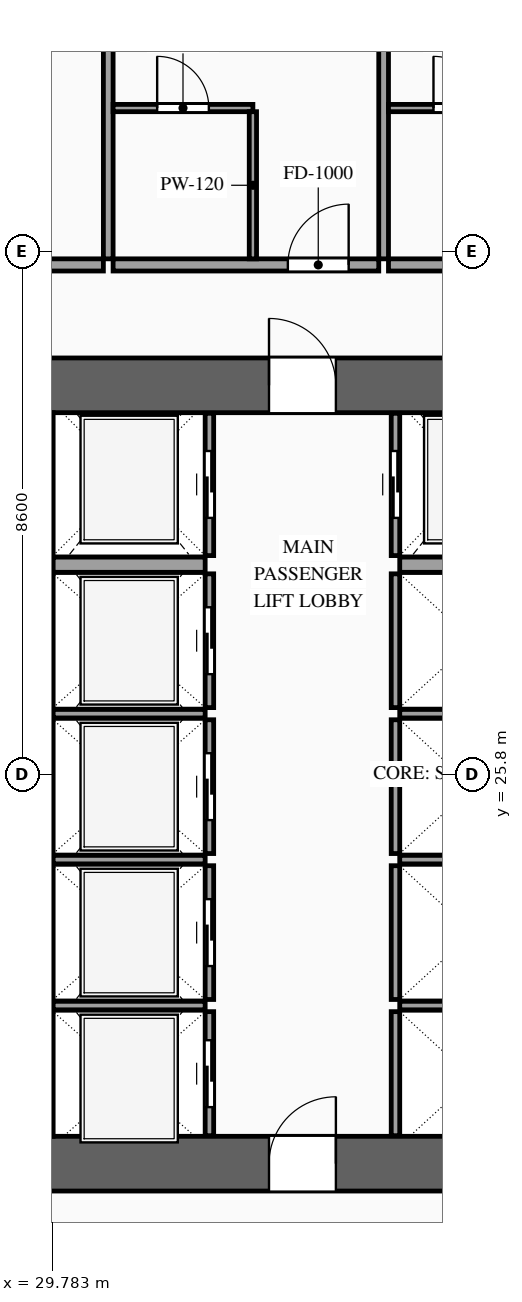
"""IFC4 building model, lengths in metres.
Left out: names, types, materials, properties, quantities, classifications, styles, units other than length and angle.
Written with IfcOpenShell. Run it as: python <this file> out.ifc"""

import sys

from ifc_helpers import new_model, si_unit, direction, frame, frame_2d, origin, place, context, subcontext, project, spatial, rectangle, extrude, source, transform, mapped, element, fill, save


model = new_model("IFC4")
c1 = context("Model", 3, precision=1e-05, world=origin(), true_north=direction((0.0, 1.0)))
c2 = subcontext(c1, "Body", "Model", "MODEL_VIEW")
j1 = project(units=[si_unit("LENGTHUNIT", "METRE"), si_unit("PLANEANGLEUNIT", "RADIAN")], contexts=[c1])
p1 = place(None, origin())
s1 = spatial("IfcSite", under=j1, at=p1, CompositionType="ELEMENT")
p2 = place(p1, origin())
s2 = spatial("IfcBuilding", under=s1, at=p2, CompositionType="ELEMENT")
p3 = place(p2, frame((0.0, 0.0, 67.6)))
s3 = spatial("IfcBuildingStorey", under=s2, at=p3, CompositionType="ELEMENT", Elevation=67.6)
p4 = place(p3, frame((23.35, 19.4, 0.0), z_axis=(0.0, 0.0, 1.0), x_axis=(1.0, 0.0, 0.0)))
e1 = element("IfcWall", 1, at=p4, inside=s3, PredefinedType="SHEAR", context=c2, shape_type="SweptSolid", body=[
    extrude(rectangle(XDim=27.3, YDim=0.9, at=frame_2d((13.65, 0.0))), origin(), (0.0, 0.0, 1.0), 3.6),
])
p5 = place(p4, frame((2.1, 0.0, 0.0)))
e2 = element("IfcOpeningElement", 2, at=p5, cuts=e1, PredefinedType="OPENING", context=c2, shape_type="SweptSolid", body=[
    extrude(rectangle(XDim=1.1, YDim=2.2, at=frame_2d((0.55, 1.1))), frame((0.0, 0.465, 0.0), z_axis=(0.0, -1.0, 0.0), x_axis=(1.0, 0.0, 0.0)), (0.0, 0.0, 1.0), 0.93),
])
p6 = place(p4, frame((10.0, 0.0, 0.0)))
e3 = element("IfcOpeningElement", 3, at=p6, cuts=e1, PredefinedType="OPENING", context=c2, shape_type="SweptSolid", body=[
    extrude(rectangle(XDim=1.1, YDim=2.2, at=frame_2d((0.55, 1.1))), frame((0.0, 0.465, 0.0), z_axis=(0.0, -1.0, 0.0), x_axis=(1.0, 0.0, 0.0)), (0.0, 0.0, 1.0), 0.93),
])
p7 = place(p4, frame((23.2, 0.0, 0.0)))
e4 = element("IfcOpeningElement", 4, at=p7, cuts=e1, PredefinedType="OPENING", context=c2, shape_type="SweptSolid", body=[
    extrude(rectangle(XDim=1.1, YDim=2.2, at=frame_2d((0.55, 1.1))), frame((0.0, 0.465, 0.0), z_axis=(0.0, -1.0, 0.0), x_axis=(1.0, 0.0, 0.0)), (0.0, 0.0, 1.0), 0.93),
])
p8 = place(p4, frame((19.82, 0.0, 0.0)))
e5 = element("IfcOpeningElement", 5, at=p8, cuts=e1, PredefinedType="OPENING", context=c2, shape_type="SweptSolid", body=[
    extrude(rectangle(XDim=0.9, YDim=2.15, at=frame_2d((0.45, 1.075))), frame((0.0, 0.465, 0.0), z_axis=(0.0, -1.0, 0.0), x_axis=(1.0, 0.0, 0.0)), (0.0, 0.0, 1.0), 0.93),
])
p9 = place(p4, frame((18.38, 0.0, 0.0)))
e6 = element("IfcOpeningElement", 6, at=p9, cuts=e1, PredefinedType="OPENING", context=c2, shape_type="SweptSolid", body=[
    extrude(rectangle(XDim=0.9, YDim=2.15, at=frame_2d((0.45, 1.075))), frame((0.0, 0.465, 0.0), z_axis=(0.0, -1.0, 0.0), x_axis=(1.0, 0.0, 0.0)), (0.0, 0.0, 1.0), 0.93),
])
p10 = place(p3, frame((23.35, 32.2, 0.0), z_axis=(0.0, 0.0, 1.0), x_axis=(1.0, 0.0, 0.0)))
e7 = element("IfcWall", 7, at=p10, inside=s3, PredefinedType="SHEAR", context=c2, shape_type="SweptSolid", body=[
    extrude(rectangle(XDim=27.3, YDim=0.9, at=frame_2d((13.65, 0.0))), origin(), (0.0, 0.0, 1.0), 3.6),
])
p11 = place(p10, frame((4.72, 0.0, 0.0)))
e8 = element("IfcOpeningElement", 8, at=p11, cuts=e7, PredefinedType="OPENING", context=c2, shape_type="SweptSolid", body=[
    extrude(rectangle(XDim=0.9, YDim=2.15, at=frame_2d((0.45, 1.075))), frame((0.0, 0.465, 0.0), z_axis=(0.0, -1.0, 0.0), x_axis=(1.0, 0.0, 0.0)), (0.0, 0.0, 1.0), 0.93),
])
p12 = place(p10, frame((10.0, 0.0, 0.0)))
e9 = element("IfcOpeningElement", 9, at=p12, cuts=e7, PredefinedType="OPENING", context=c2, shape_type="SweptSolid", body=[
    extrude(rectangle(XDim=1.1, YDim=2.2, at=frame_2d((0.55, 1.1))), frame((0.0, 0.465, 0.0), z_axis=(0.0, -1.0, 0.0), x_axis=(1.0, 0.0, 0.0)), (0.0, 0.0, 1.0), 0.93),
])
p13 = place(p10, frame((15.85, 0.0, 0.0)))
e10 = element("IfcOpeningElement", 10, at=p13, cuts=e7, PredefinedType="OPENING", context=c2, shape_type="SweptSolid", body=[
    extrude(rectangle(XDim=1.1, YDim=2.2, at=frame_2d((0.55, 1.1))), frame((0.0, 0.465, 0.0), z_axis=(0.0, -1.0, 0.0), x_axis=(1.0, 0.0, 0.0)), (0.0, 0.0, 1.0), 0.93),
])
p14 = place(p10, frame((18.38, 0.0, 0.0)))
e11 = element("IfcOpeningElement", 11, at=p14, cuts=e7, PredefinedType="OPENING", context=c2, shape_type="SweptSolid", body=[
    extrude(rectangle(XDim=0.9, YDim=2.15, at=frame_2d((0.45, 1.075))), frame((0.0, 0.465, 0.0), z_axis=(0.0, -1.0, 0.0), x_axis=(1.0, 0.0, 0.0)), (0.0, 0.0, 1.0), 0.93),
])
p15 = place(p10, frame((19.82, 0.0, 0.0)))
e12 = element("IfcOpeningElement", 12, at=p15, cuts=e7, PredefinedType="OPENING", context=c2, shape_type="SweptSolid", body=[
    extrude(rectangle(XDim=0.9, YDim=2.15, at=frame_2d((0.45, 1.075))), frame((0.0, 0.465, 0.0), z_axis=(0.0, -1.0, 0.0), x_axis=(1.0, 0.0, 0.0)), (0.0, 0.0, 1.0), 0.93),
])
m1 = source(origin(), c2, "Body", "SweptSolid", [
    extrude(rectangle(XDim=11.9, YDim=0.3, at=frame_2d((5.95, 0.0))), origin(), (0.0, 0.0, 1.0), 3.6),
])
p16 = place(p3, frame((29.65, 19.85, 0.0), z_axis=(0.0, 0.0, 1.0), x_axis=(0.0, 1.0, 0.0)))
e13 = element("IfcWall", 13, at=p16, inside=s3, PredefinedType="SOLIDWALL", context=c2, shape_type="MappedRepresentation", body=[
    mapped(m1, transform((0.0, 0.0, 0.0), scale=1.0)),
])
p17 = place(p3, frame((32.37, 19.86, 0.0), z_axis=(0.0, 0.0, 1.0), x_axis=(0.0, 1.0, 0.0)))
e14 = element("IfcWall", 14, at=p17, inside=s3, PredefinedType="SOLIDWALL", context=c2, shape_type="SweptSolid", body=[
    extrude(rectangle(XDim=2.04, YDim=0.14, at=frame_2d((1.02, 0.0))), origin(), (0.0, 0.0, 1.0), 3.38),
])
p18 = place(p17, frame((0.47, 0.0, 0.0)))
e15 = element("IfcOpeningElement", 15, at=p18, cuts=e14, PredefinedType="OPENING", context=c2, shape_type="SweptSolid", body=[
    extrude(rectangle(XDim=1.1, YDim=2.2, at=frame_2d((0.55, 1.1))), frame((0.0, 0.085, 0.0), z_axis=(0.0, -1.0, 0.0), x_axis=(1.0, 0.0, 0.0)), (0.0, 0.0, 1.0), 0.17),
])
m2 = source(origin(), c2, "Body", "SweptSolid", [
    extrude(rectangle(XDim=2.5, YDim=0.14, at=frame_2d((1.25, 0.0))), origin(), (0.0, 0.0, 1.0), 3.38),
])
p19 = place(p3, frame((29.8, 22.0, 0.0), z_axis=(0.0, 0.0, 1.0), x_axis=(1.0, 0.0, 0.0)))
e16 = element("IfcWall", 16, at=p19, inside=s3, PredefinedType="SOLIDWALL", context=c2, shape_type="MappedRepresentation", body=[
    mapped(m2, transform((0.0, 0.0, 0.0), scale=1.0)),
])
p20 = place(p3, frame((32.37, 22.1, 0.0), z_axis=(0.0, 0.0, 1.0), x_axis=(0.0, 1.0, 0.0)))
e17 = element("IfcWall", 17, at=p20, inside=s3, PredefinedType="SOLIDWALL", context=c2, shape_type="SweptSolid", body=[
    extrude(rectangle(XDim=2.2, YDim=0.14, at=frame_2d((1.1, 0.0))), origin(), (0.0, 0.0, 1.0), 3.38),
])
p21 = place(p20, frame((0.55, 0.0, 0.0)))
e18 = element("IfcOpeningElement", 18, at=p21, cuts=e17, PredefinedType="OPENING", context=c2, shape_type="SweptSolid", body=[
    extrude(rectangle(XDim=1.1, YDim=2.2, at=frame_2d((0.55, 1.1))), frame((0.0, 0.085, 0.0), z_axis=(0.0, -1.0, 0.0), x_axis=(1.0, 0.0, 0.0)), (0.0, 0.0, 1.0), 0.17),
])
p22 = place(p3, frame((29.8, 24.4, 0.0), z_axis=(0.0, 0.0, 1.0), x_axis=(1.0, 0.0, 0.0)))
e19 = element("IfcWall", 19, at=p22, inside=s3, PredefinedType="SOLIDWALL", context=c2, shape_type="MappedRepresentation", body=[
    mapped(m2, transform((0.0, 0.0, 0.0), scale=1.0)),
])
p23 = place(p3, frame((32.37, 24.5, 0.0), z_axis=(0.0, 0.0, 1.0), x_axis=(0.0, 1.0, 0.0)))
e20 = element("IfcWall", 20, at=p23, inside=s3, PredefinedType="SOLIDWALL", context=c2, shape_type="SweptSolid", body=[
    extrude(rectangle(XDim=2.2, YDim=0.14, at=frame_2d((1.1, 0.0))), origin(), (0.0, 0.0, 1.0), 3.38),
])
p24 = place(p23, frame((0.55, 0.0, 0.0)))
e21 = element("IfcOpeningElement", 21, at=p24, cuts=e20, PredefinedType="OPENING", context=c2, shape_type="SweptSolid", body=[
    extrude(rectangle(XDim=1.1, YDim=2.2, at=frame_2d((0.55, 1.1))), frame((0.0, 0.085, 0.0), z_axis=(0.0, -1.0, 0.0), x_axis=(1.0, 0.0, 0.0)), (0.0, 0.0, 1.0), 0.17),
])
p25 = place(p3, frame((29.8, 26.8, 0.0), z_axis=(0.0, 0.0, 1.0), x_axis=(1.0, 0.0, 0.0)))
e22 = element("IfcWall", 22, at=p25, inside=s3, PredefinedType="SOLIDWALL", context=c2, shape_type="MappedRepresentation", body=[
    mapped(m2, transform((0.0, 0.0, 0.0), scale=1.0)),
])
p26 = place(p3, frame((32.37, 26.9, 0.0), z_axis=(0.0, 0.0, 1.0), x_axis=(0.0, 1.0, 0.0)))
e23 = element("IfcWall", 23, at=p26, inside=s3, PredefinedType="SOLIDWALL", context=c2, shape_type="SweptSolid", body=[
    extrude(rectangle(XDim=2.2, YDim=0.14, at=frame_2d((1.1, 0.0))), origin(), (0.0, 0.0, 1.0), 3.38),
])
p27 = place(p26, frame((0.55, 0.0, 0.0)))
e24 = element("IfcOpeningElement", 24, at=p27, cuts=e23, PredefinedType="OPENING", context=c2, shape_type="SweptSolid", body=[
    extrude(rectangle(XDim=1.1, YDim=2.2, at=frame_2d((0.55, 1.1))), frame((0.0, 0.085, 0.0), z_axis=(0.0, -1.0, 0.0), x_axis=(1.0, 0.0, 0.0)), (0.0, 0.0, 1.0), 0.17),
])
p28 = place(p3, frame((32.37, 29.4, 0.0), z_axis=(0.0, 0.0, 1.0), x_axis=(0.0, 1.0, 0.0)))
e25 = element("IfcWall", 25, at=p28, inside=s3, PredefinedType="SOLIDWALL", context=c2, shape_type="SweptSolid", body=[
    extrude(rectangle(XDim=2.34, YDim=0.14, at=frame_2d((1.17, 0.0))), origin(), (0.0, 0.0, 1.0), 3.38),
])
p29 = place(p28, frame((0.62, 0.0, 0.0)))
e26 = element("IfcOpeningElement", 26, at=p29, cuts=e25, PredefinedType="OPENING", context=c2, shape_type="SweptSolid", body=[
    extrude(rectangle(XDim=1.1, YDim=2.2, at=frame_2d((0.55, 1.1))), frame((0.0, 0.085, 0.0), z_axis=(0.0, -1.0, 0.0), x_axis=(1.0, 0.0, 0.0)), (0.0, 0.0, 1.0), 0.17),
])
m3 = source(origin(), c2, "Body", "SweptSolid", [
    extrude(rectangle(XDim=2.5, YDim=0.25, at=frame_2d((1.25, 0.0))), origin(), (0.0, 0.0, 1.0), 3.38),
])
p30 = place(p3, frame((29.8, 29.25, 0.0), z_axis=(0.0, 0.0, 1.0), x_axis=(1.0, 0.0, 0.0)))
e27 = element("IfcWall", 27, at=p30, inside=s3, PredefinedType="SOLIDWALL", context=c2, shape_type="MappedRepresentation", body=[
    mapped(m3, transform((0.0, 0.0, 0.0), scale=1.0)),
])
m4 = source(origin(), c2, "Body", "SweptSolid", [
    extrude(rectangle(XDim=2.04, YDim=0.14, at=frame_2d((1.02, 0.0))), origin(), (0.0, 0.0, 1.0), 3.38),
])
p31 = place(p3, frame((35.43, 19.86, 0.0), z_axis=(0.0, 0.0, 1.0), x_axis=(0.0, 1.0, 0.0)))
e28 = element("IfcWall", 28, at=p31, inside=s3, PredefinedType="SOLIDWALL", context=c2, shape_type="MappedRepresentation", body=[
    mapped(m4, transform((0.0, 0.0, 0.0), scale=1.0)),
])
m5 = source(origin(), c2, "Body", "SweptSolid", [
    extrude(rectangle(XDim=2.4, YDim=0.14, at=frame_2d((1.2, 0.0))), origin(), (0.0, 0.0, 1.0), 3.38),
])
p32 = place(p3, frame((35.5, 22.0, 0.0), z_axis=(0.0, 0.0, 1.0), x_axis=(1.0, 0.0, 0.0)))
e29 = element("IfcWall", 29, at=p32, inside=s3, PredefinedType="SOLIDWALL", context=c2, shape_type="MappedRepresentation", body=[
    mapped(m5, transform((0.0, 0.0, 0.0), scale=1.0)),
])
m6 = source(origin(), c2, "Body", "SweptSolid", [
    extrude(rectangle(XDim=2.2, YDim=0.14, at=frame_2d((1.1, 0.0))), origin(), (0.0, 0.0, 1.0), 3.38),
])
p33 = place(p3, frame((35.43, 22.1, 0.0), z_axis=(0.0, 0.0, 1.0), x_axis=(0.0, 1.0, 0.0)))
e30 = element("IfcWall", 30, at=p33, inside=s3, PredefinedType="SOLIDWALL", context=c2, shape_type="MappedRepresentation", body=[
    mapped(m6, transform((0.0, 0.0, 0.0), scale=1.0)),
])
p34 = place(p3, frame((35.5, 24.4, 0.0), z_axis=(0.0, 0.0, 1.0), x_axis=(1.0, 0.0, 0.0)))
e31 = element("IfcWall", 31, at=p34, inside=s3, PredefinedType="SOLIDWALL", context=c2, shape_type="MappedRepresentation", body=[
    mapped(m5, transform((0.0, 0.0, 0.0), scale=1.0)),
])
p35 = place(p3, frame((35.43, 24.5, 0.0), z_axis=(0.0, 0.0, 1.0), x_axis=(0.0, 1.0, 0.0)))
e32 = element("IfcWall", 32, at=p35, inside=s3, PredefinedType="SOLIDWALL", context=c2, shape_type="MappedRepresentation", body=[
    mapped(m6, transform((0.0, 0.0, 0.0), scale=1.0)),
])
p36 = place(p3, frame((35.5, 26.8, 0.0), z_axis=(0.0, 0.0, 1.0), x_axis=(1.0, 0.0, 0.0)))
e33 = element("IfcWall", 33, at=p36, inside=s3, PredefinedType="SOLIDWALL", context=c2, shape_type="MappedRepresentation", body=[
    mapped(m5, transform((0.0, 0.0, 0.0), scale=1.0)),
])
m7 = source(origin(), c2, "Body", "SweptSolid", [
    extrude(rectangle(XDim=2.2, YDim=0.14, at=frame_2d((1.1, 0.0))), origin(), (0.0, 0.0, 1.0), 3.38),
])
p37 = place(p3, frame((35.43, 26.9, 0.0), z_axis=(0.0, 0.0, 1.0), x_axis=(0.0, 1.0, 0.0)))
e34 = element("IfcWall", 34, at=p37, inside=s3, PredefinedType="SOLIDWALL", context=c2, shape_type="MappedRepresentation", body=[
    mapped(m7, transform((0.0, 0.0, 0.0), scale=1.0)),
])
p38 = place(p3, frame((35.43, 29.4, 0.0), z_axis=(0.0, 0.0, 1.0), x_axis=(0.0, 1.0, 0.0)))
e35 = element("IfcWall", 35, at=p38, inside=s3, PredefinedType="SOLIDWALL", context=c2, shape_type="SweptSolid", body=[
    extrude(rectangle(XDim=2.34, YDim=0.14, at=frame_2d((1.17, 0.0))), origin(), (0.0, 0.0, 1.0), 3.38),
])
p39 = place(p38, frame((0.62, 0.0, 0.0)))
e36 = element("IfcOpeningElement", 36, at=p39, cuts=e35, PredefinedType="OPENING", context=c2, shape_type="SweptSolid", body=[
    extrude(rectangle(XDim=1.1, YDim=2.2, at=frame_2d((0.55, 1.1))), frame((0.0, 0.085, 0.0), z_axis=(0.0, -1.0, 0.0), x_axis=(1.0, 0.0, 0.0)), (0.0, 0.0, 1.0), 0.17),
])
m8 = source(origin(), c2, "Body", "SweptSolid", [
    extrude(rectangle(XDim=2.4, YDim=0.25, at=frame_2d((1.2, 0.0))), origin(), (0.0, 0.0, 1.0), 3.38),
])
p40 = place(p3, frame((35.5, 29.25, 0.0), z_axis=(0.0, 0.0, 1.0), x_axis=(1.0, 0.0, 0.0)))
e37 = element("IfcWall", 37, at=p40, inside=s3, PredefinedType="SOLIDWALL", context=c2, shape_type="MappedRepresentation", body=[
    mapped(m8, transform((0.0, 0.0, 0.0), scale=1.0)),
])
p41 = place(p3, frame((21.197, 34.18, 0.0), z_axis=(0.0, 0.0, 1.0), x_axis=(1.0, 0.0, 0.0)))
e38 = element("IfcWall", 38, at=p41, inside=s3, PredefinedType="PARTITIONING", context=c2, shape_type="SweptSolid", body=[
    extrude(rectangle(XDim=9.429, YDim=0.2, at=frame_2d((4.714, 0.0))), origin(), (0.0, 0.0, 1.0), 3.38),
])
p42 = place(p41, frame((5.42, 0.0, 0.0)))
e39 = element("IfcOpeningElement", 39, at=p42, cuts=e38, PredefinedType="OPENING", context=c2, shape_type="SweptSolid", body=[
    extrude(rectangle(XDim=1.0, YDim=2.2, at=frame_2d((0.5, 1.1))), frame((0.0, 0.115, 0.0), z_axis=(0.0, -1.0, 0.0), x_axis=(1.0, 0.0, 0.0)), (0.0, 0.0, 1.0), 0.23),
])
m9 = source(origin(), c2, "Body", "SweptSolid", [
    extrude(rectangle(XDim=16.47, YDim=0.16, at=frame_2d((8.235, 0.0))), origin(), (0.0, 0.0, 1.0), 3.38),
])
p43 = place(p3, frame((30.706, 34.28, 0.0), z_axis=(0.0, 0.0, 1.0), x_axis=(0.0, 1.0, 0.0)))
e40 = element("IfcWall", 40, at=p43, inside=s3, PredefinedType="PARTITIONING", context=c2, shape_type="MappedRepresentation", body=[
    mapped(m9, transform((0.0, 0.0, 0.0), scale=1.0)),
])
p44 = place(p3, frame((30.786, 34.18, 0.0), z_axis=(0.0, 0.0, 1.0), x_axis=(1.0, 0.0, 0.0)))
e41 = element("IfcWall", 41, at=p44, inside=s3, PredefinedType="PARTITIONING", context=c2, shape_type="SweptSolid", body=[
    extrude(rectangle(XDim=4.369, YDim=0.2, at=frame_2d((2.185, 0.0))), origin(), (0.0, 0.0, 1.0), 3.38),
])
p45 = place(p44, frame((2.874, 0.0, 0.0)))
e42 = element("IfcOpeningElement", 42, at=p45, cuts=e41, PredefinedType="OPENING", context=c2, shape_type="SweptSolid", body=[
    extrude(rectangle(XDim=1.0, YDim=2.2, at=frame_2d((0.5, 1.1))), frame((0.0, 0.115, 0.0), z_axis=(0.0, -1.0, 0.0), x_axis=(1.0, 0.0, 0.0)), (0.0, 0.0, 1.0), 0.23),
])
p46 = place(p3, frame((35.235, 34.28, 0.0), z_axis=(0.0, 0.0, 1.0), x_axis=(0.0, 1.0, 0.0)))
e43 = element("IfcWall", 43, at=p46, inside=s3, PredefinedType="PARTITIONING", context=c2, shape_type="MappedRepresentation", body=[
    mapped(m9, transform((0.0, 0.0, 0.0), scale=1.0)),
])
p47 = place(p3, frame((30.786, 36.76, 0.0), z_axis=(0.0, 0.0, 1.0), x_axis=(1.0, 0.0, 0.0)))
e44 = element("IfcWall", 44, at=p47, inside=s3, PredefinedType="PARTITIONING", context=c2, shape_type="SweptSolid", body=[
    extrude(rectangle(XDim=2.299, YDim=0.12, at=frame_2d((1.149, 0.0))), origin(), (0.0, 0.0, 1.0), 3.38),
])
p48 = place(p47, frame((0.725, 0.0, 0.0)))
e45 = element("IfcOpeningElement", 45, at=p48, cuts=e44, PredefinedType="OPENING", context=c2, shape_type="SweptSolid", body=[
    extrude(rectangle(XDim=0.85, YDim=2.1, at=frame_2d((0.425, 1.05))), frame((0.0, 0.075, 0.0), z_axis=(0.0, -1.0, 0.0), x_axis=(1.0, 0.0, 0.0)), (0.0, 0.0, 1.0), 0.15),
])
m10 = source(origin(), c2, "Body", "SweptSolid", [
    extrude(rectangle(XDim=2.42, YDim=0.12, at=frame_2d((1.21, 0.0))), origin(), (0.0, 0.0, 1.0), 3.38),
])
p49 = place(p3, frame((33.085, 34.28, 0.0), z_axis=(0.0, 0.0, 1.0), x_axis=(0.0, 1.0, 0.0)))
e46 = element("IfcWall", 46, at=p49, inside=s3, PredefinedType="PARTITIONING", context=c2, shape_type="MappedRepresentation", body=[
    mapped(m10, transform((0.0, 0.0, 0.0), scale=1.0)),
])
p50 = place(p3, frame((35.315, 34.18, 0.0), z_axis=(0.0, 0.0, 1.0), x_axis=(1.0, 0.0, 0.0)))
e47 = element("IfcWall", 47, at=p50, inside=s3, PredefinedType="PARTITIONING", context=c2, shape_type="SweptSolid", body=[
    extrude(rectangle(XDim=10.017, YDim=0.2, at=frame_2d((5.009, 0.0))), origin(), (0.0, 0.0, 1.0), 3.38),
])
p51 = place(p50, frame((5.713, 0.0, 0.0)))
e48 = element("IfcOpeningElement", 48, at=p51, cuts=e47, PredefinedType="OPENING", context=c2, shape_type="SweptSolid", body=[
    extrude(rectangle(XDim=1.0, YDim=2.2, at=frame_2d((0.5, 1.1))), frame((0.0, 0.115, 0.0), z_axis=(0.0, -1.0, 0.0), x_axis=(1.0, 0.0, 0.0)), (0.0, 0.0, 1.0), 0.23),
])
p52 = place(p3, frame((35.315, 36.76, 0.0), z_axis=(0.0, 0.0, 1.0), x_axis=(1.0, 0.0, 0.0)))
e49 = element("IfcWall", 49, at=p52, inside=s3, PredefinedType="PARTITIONING", context=c2, shape_type="SweptSolid", body=[
    extrude(rectangle(XDim=2.33, YDim=0.12, at=frame_2d((1.165, 0.0))), origin(), (0.0, 0.0, 1.0), 3.38),
])
p53 = place(p52, frame((0.74, 0.0, 0.0)))
e50 = element("IfcOpeningElement", 50, at=p53, cuts=e49, PredefinedType="OPENING", context=c2, shape_type="SweptSolid", body=[
    extrude(rectangle(XDim=0.85, YDim=2.1, at=frame_2d((0.425, 1.05))), frame((0.0, 0.075, 0.0), z_axis=(0.0, -1.0, 0.0), x_axis=(1.0, 0.0, 0.0)), (0.0, 0.0, 1.0), 0.15),
])
m11 = source(origin(), c2, "Body", "SweptSolid", [
    extrude(rectangle(XDim=1.1, YDim=2.2, at=frame_2d((0.55, 1.1))), frame((0.0, 0.025, 0.0), z_axis=(0.0, -1.0, 0.0), x_axis=(1.0, 0.0, 0.0)), (0.0, 0.0, 1.0), 0.05),
])
p54 = place(p18, origin())
e51 = element("IfcDoor", 51, at=p54, inside=s3, OperationType="SLIDING_TO_LEFT", PredefinedType="DOOR", context=c2, shape_type="MappedRepresentation", body=[
    mapped(m11, transform((0.0, 0.0, 0.0), scale=1.0)),
])
fill(e15, e51)
p55 = place(p21, origin())
e52 = element("IfcDoor", 52, at=p55, inside=s3, OperationType="SLIDING_TO_RIGHT", PredefinedType="DOOR", context=c2, shape_type="MappedRepresentation", body=[
    mapped(m11, transform((0.0, 0.0, 0.0), scale=1.0)),
])
fill(e18, e52)
p56 = place(p24, origin())
e53 = element("IfcDoor", 53, at=p56, inside=s3, OperationType="SLIDING_TO_LEFT", PredefinedType="DOOR", context=c2, shape_type="MappedRepresentation", body=[
    mapped(m11, transform((0.0, 0.0, 0.0), scale=1.0)),
])
fill(e21, e53)
p57 = place(p27, origin())
e54 = element("IfcDoor", 54, at=p57, inside=s3, OperationType="SLIDING_TO_RIGHT", PredefinedType="DOOR", context=c2, shape_type="MappedRepresentation", body=[
    mapped(m11, transform((0.0, 0.0, 0.0), scale=1.0)),
])
fill(e24, e54)
p58 = place(p29, origin())
e55 = element("IfcDoor", 55, at=p58, inside=s3, OperationType="SLIDING_TO_LEFT", PredefinedType="DOOR", context=c2, shape_type="MappedRepresentation", body=[
    mapped(m11, transform((0.0, 0.0, 0.0), scale=1.0)),
])
fill(e26, e55)
p59 = place(p39, origin())
e56 = element("IfcDoor", 56, at=p59, inside=s3, OperationType="SLIDING_TO_RIGHT", PredefinedType="DOOR", context=c2, shape_type="MappedRepresentation", body=[
    mapped(m11, transform((0.0, 0.0, 0.0), scale=1.0)),
])
fill(e36, e56)
m12 = source(origin(), c2, "Body", "SweptSolid", [
    extrude(rectangle(XDim=1.1, YDim=2.2, at=frame_2d((0.55, 1.1))), frame((0.0, 0.025, 0.0), z_axis=(0.0, -1.0, 0.0), x_axis=(1.0, 0.0, 0.0)), (0.0, 0.0, 1.0), 0.05),
])
p60 = place(p6, origin())
e57 = element("IfcDoor", 57, at=p60, inside=s3, OperationType="SINGLE_SWING_RIGHT", PredefinedType="DOOR", context=c2, shape_type="MappedRepresentation", body=[
    mapped(m12, transform((0.0, 0.0, 0.0), scale=1.0)),
])
fill(e3, e57)
p61 = place(p12, origin())
e58 = element("IfcDoor", 58, at=p61, inside=s3, OperationType="SINGLE_SWING_LEFT", PredefinedType="DOOR", context=c2, shape_type="MappedRepresentation", body=[
    mapped(m12, transform((0.0, 0.0, 0.0), scale=1.0)),
])
fill(e9, e58)
m13 = source(origin(), c2, "Body", "SweptSolid", [
    extrude(rectangle(XDim=1.0, YDim=2.2, at=frame_2d((0.5, 1.1))), frame((0.0, 0.025, 0.0), z_axis=(0.0, -1.0, 0.0), x_axis=(1.0, 0.0, 0.0)), (0.0, 0.0, 1.0), 0.05),
])
p62 = place(p45, origin())
e59 = element("IfcDoor", 59, at=p62, inside=s3, OperationType="SINGLE_SWING_RIGHT", PredefinedType="DOOR", context=c2, shape_type="MappedRepresentation", body=[
    mapped(m13, transform((0.0, 0.0, 0.0), scale=1.0)),
])
fill(e42, e59)
m14 = source(origin(), c2, "Body", "SweptSolid", [
    extrude(rectangle(XDim=0.85, YDim=2.1, at=frame_2d((0.425, 1.05))), frame((0.0, 0.025, 0.0), z_axis=(0.0, -1.0, 0.0), x_axis=(1.0, 0.0, 0.0)), (0.0, 0.0, 1.0), 0.05),
])
p63 = place(p48, origin())
e60 = element("IfcDoor", 60, at=p63, inside=s3, OperationType="SINGLE_SWING_LEFT", PredefinedType="DOOR", context=c2, shape_type="MappedRepresentation", body=[
    mapped(m14, transform((0.0, 0.0, 0.0), scale=1.0)),
])
fill(e45, e60)
p64 = place(p53, origin())
e61 = element("IfcDoor", 61, at=p64, inside=s3, OperationType="SINGLE_SWING_LEFT", PredefinedType="DOOR", context=c2, shape_type="MappedRepresentation", body=[
    mapped(m14, transform((0.0, 0.0, 0.0), scale=1.0)),
])
fill(e50, e61)
save(model, sys.argv[1])
